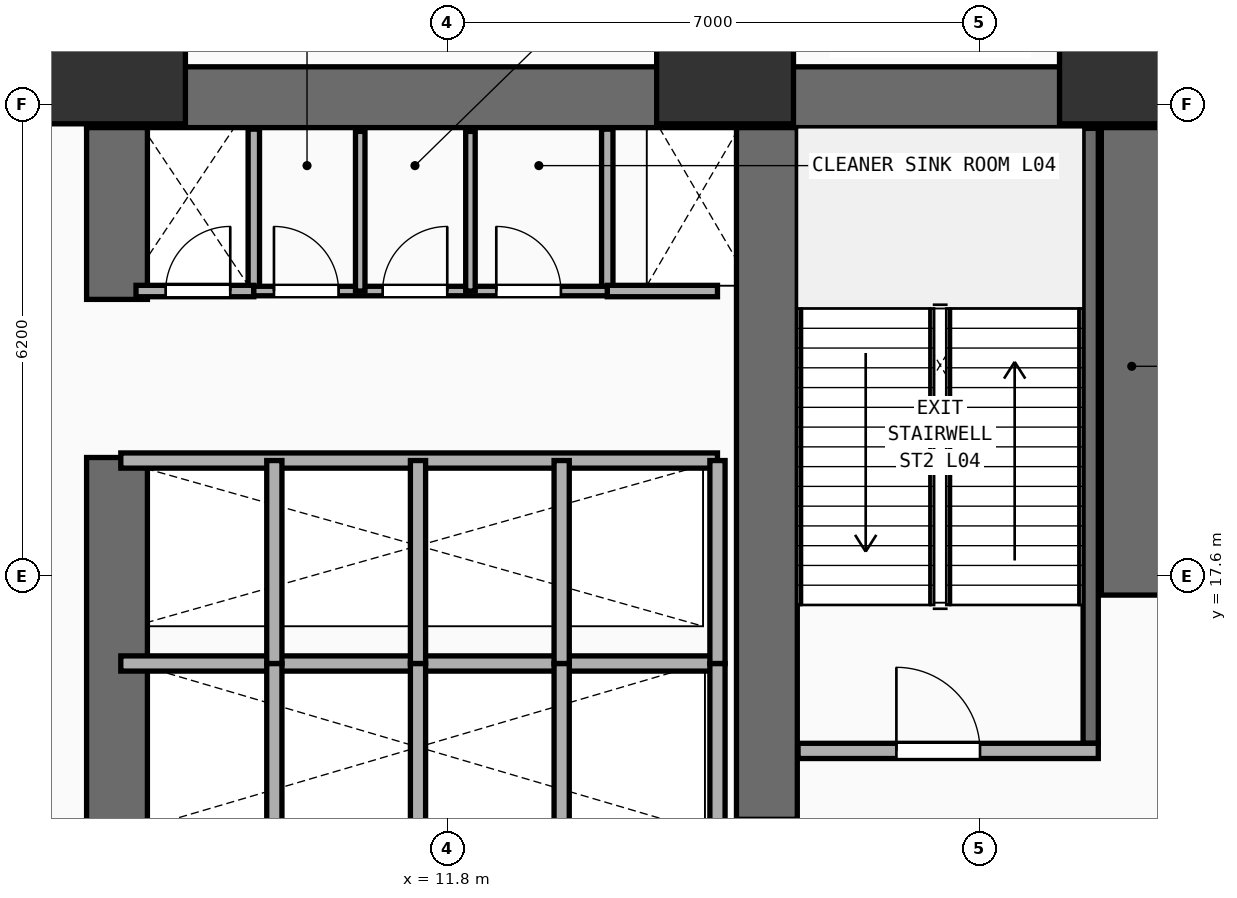
"""IFC4 building model, lengths in metres.
Left out: names, types, materials, properties, quantities, classifications, styles, units other than length and angle.
Written with IfcOpenShell. Run it as: python <this file> out.ifc"""

import sys

from ifc_helpers import new_model, si_unit, direction, frame, frame_2d, origin, origin_2d, place, context, subcontext, project, spatial, rectangle, extrude, element, fill, save


model = new_model("IFC4")
c1 = context("Model", 3, precision=1e-05, world=origin(), true_north=direction((0.0, 1.0)))
c2 = subcontext(c1, "Body", "Model", "MODEL_VIEW")
j1 = project(units=[si_unit("LENGTHUNIT", "METRE"), si_unit("PLANEANGLEUNIT", "RADIAN")], contexts=[c1])
p1 = place(None, origin())
s1 = spatial("IfcSite", under=j1, at=p1, CompositionType="ELEMENT")
p2 = place(p1, origin())
s2 = spatial("IfcBuilding", under=s1, at=p2, CompositionType="ELEMENT")
p3 = place(p2, frame((0.0, 0.0, 15.2)))
s3 = spatial("IfcBuildingStorey", under=s2, at=p3, CompositionType="ELEMENT", Elevation=15.2)
p4 = place(p3, frame((7.05, 23.9, 0.0), z_axis=(0.0, 0.0, 1.0), x_axis=(1.0, 0.0, 0.0)))
e1 = element("IfcWall", 1, at=p4, inside=s3, PredefinedType="SHEAR", context=c2, shape_type="SweptSolid", body=[
    extrude(rectangle(XDim=14.15, YDim=0.8, at=frame_2d((7.075, 0.0))), origin(), (0.0, 0.0, 1.0), 4.46),
])
p5 = place(p3, frame((7.45, 14.35, 0.0), z_axis=(0.0, 0.0, 1.0), x_axis=(0.0, 1.0, 0.0)))
e2 = element("IfcWall", 2, at=p5, inside=s3, PredefinedType="SHEAR", context=c2, shape_type="SweptSolid", body=[
    extrude(rectangle(XDim=4.81, YDim=0.8, at=frame_2d((2.405, 0.0))), origin(), (0.0, 0.0, 1.0), 4.46),
])
p6 = place(p3, frame((7.45, 21.24, 0.0), z_axis=(0.0, 0.0, 1.0), x_axis=(0.0, 1.0, 0.0)))
e3 = element("IfcWall", 3, at=p6, inside=s3, PredefinedType="SHEAR", context=c2, shape_type="SweptSolid", body=[
    extrude(rectangle(XDim=2.26, YDim=0.8, at=frame_2d((1.13, 0.0))), origin(), (0.0, 0.0, 1.0), 4.46),
])
p7 = place(p3, frame((20.8, 17.35, 0.0), z_axis=(0.0, 0.0, 1.0), x_axis=(0.0, 1.0, 0.0)))
e4 = element("IfcWall", 4, at=p7, inside=s3, PredefinedType="SHEAR", context=c2, shape_type="SweptSolid", body=[
    extrude(rectangle(XDim=6.15, YDim=0.8, at=frame_2d((3.075, 0.0))), origin(), (0.0, 0.0, 1.0), 4.46),
])
p8 = place(p3, frame((16.0, 14.4, 0.0), z_axis=(0.0, 0.0, 1.0), x_axis=(0.0, 1.0, 0.0)))
e5 = element("IfcWall", 5, at=p8, inside=s3, PredefinedType="SHEAR", context=c2, shape_type="SweptSolid", body=[
    extrude(rectangle(XDim=9.1, YDim=0.8, at=frame_2d((4.55, 0.0))), origin(), (0.0, 0.0, 1.0), 4.46),
])
for number, where, z_axis, x_axis in (
    (6, (7.45, 24.45, 0.0), (0.0, 0.0, 1.0), (1.0, 0.0, 0.0)),
    (7, (15.45, 24.45, 0.0), (0.0, 0.0, 1.0), (1.0, 0.0, 0.0)),
    (8, (20.75, 24.45, 0.0), (0.0, 0.0, 1.0), (1.0, 0.0, 0.0)),
):
    element("IfcColumn", number, at=place(p3, frame(where, z_axis=z_axis, x_axis=x_axis)), inside=s3, PredefinedType="COLUMN", context=c2, shape_type="SweptSolid", body=[
        extrude(rectangle(XDim=1.8, YDim=1.8, at=origin_2d()), origin(), (0.0, 0.0, 1.0), 4.46),
    ])
p9 = place(p3, frame((20.26, 15.4, 0.0), z_axis=(0.0, 0.0, 1.0), x_axis=(0.0, 1.0, 0.0)))
e9 = element("IfcWall", 9, at=p9, inside=s3, PredefinedType="SHEAR", context=c2, shape_type="SweptSolid", body=[
    extrude(rectangle(XDim=8.09, YDim=0.2, at=frame_2d((4.045, 0.0))), origin(), (0.0, 0.0, 1.0), 4.46),
])
p10 = place(p3, frame((16.41, 15.3, 0.0), z_axis=(0.0, 0.0, 1.0), x_axis=(1.0, 0.0, 0.0)))
e10 = element("IfcWall", 10, at=p10, inside=s3, PredefinedType="PARTITIONING", context=c2, shape_type="SweptSolid", body=[
    extrude(rectangle(XDim=3.95, YDim=0.2, at=frame_2d((1.975, 0.0))), origin(), (0.0, 0.0, 1.0), 4.46),
])
p11 = place(p10, frame((1.294, 0.0, 0.0)))
e11 = element("IfcOpeningElement", 11, at=p11, cuts=e10, PredefinedType="OPENING", context=c2, shape_type="SweptSolid", body=[
    extrude(rectangle(XDim=1.1, YDim=2.2, at=frame_2d((0.55, 1.1))), frame((0.0, 0.11, 0.0), z_axis=(0.0, -1.0, 0.0), x_axis=(1.0, 0.0, 0.0)), (0.0, 0.0, 1.0), 0.22),
])
p12 = place(p3, frame((7.5, 16.45, 0.0), z_axis=(0.0, 0.0, 1.0), x_axis=(1.0, 0.0, 0.0)))
e12 = element("IfcWall", 12, at=p12, inside=s3, PredefinedType="PARTITIONING", context=c2, shape_type="SweptSolid", body=[
    extrude(rectangle(XDim=7.85, YDim=0.2, at=frame_2d((3.925, 0.0))), origin(), (0.0, 0.0, 1.0), 4.46),
])
for number, where, z_axis, x_axis in (
    (13, (15.35, 14.22, 0.0), (0.0, 0.0, 1.0), (0.0, 1.0, 0.0)),
    (14, (9.52, 14.22, 0.0), (0.0, 0.0, 1.0), (0.0, 1.0, 0.0)),
    (15, (11.41, 14.22, 0.0), (0.0, 0.0, 1.0), (0.0, 1.0, 0.0)),
    (16, (13.3, 14.22, 0.0), (0.0, 0.0, 1.0), (0.0, 1.0, 0.0)),
):
    element("IfcWall", number, at=place(p3, frame(where, z_axis=z_axis, x_axis=x_axis)), inside=s3, PredefinedType="PARTITIONING", context=c2, shape_type="SweptSolid", body=[
        extrude(rectangle(XDim=2.23, YDim=0.2, at=frame_2d((1.115, 0.0))), origin(), (0.0, 0.0, 1.0), 4.46),
    ])
p13 = place(p3, frame((7.5, 19.12, 0.0), z_axis=(0.0, 0.0, 1.0), x_axis=(1.0, 0.0, 0.0)))
e17 = element("IfcWall", 17, at=p13, inside=s3, PredefinedType="PARTITIONING", context=c2, shape_type="SweptSolid", body=[
    extrude(rectangle(XDim=7.85, YDim=0.2, at=frame_2d((3.925, 0.0))), origin(), (0.0, 0.0, 1.0), 4.46),
])
for number, where, z_axis, x_axis in (
    (18, (15.35, 16.45, 0.0), (0.0, 0.0, 1.0), (0.0, 1.0, 0.0)),
    (19, (9.52, 16.45, 0.0), (0.0, 0.0, 1.0), (0.0, 1.0, 0.0)),
    (20, (11.41, 16.45, 0.0), (0.0, 0.0, 1.0), (0.0, 1.0, 0.0)),
    (21, (13.3, 16.45, 0.0), (0.0, 0.0, 1.0), (0.0, 1.0, 0.0)),
):
    element("IfcWall", number, at=place(p3, frame(where, z_axis=z_axis, x_axis=x_axis)), inside=s3, PredefinedType="PARTITIONING", context=c2, shape_type="SweptSolid", body=[
        extrude(rectangle(XDim=2.67, YDim=0.2, at=frame_2d((1.335, 0.0))), origin(), (0.0, 0.0, 1.0), 4.46),
    ])
for number, where, z_axis, x_axis in (
    (22, (9.25, 21.35, 0.0), (0.0, 0.0, 1.0), (0.0, 1.0, 0.0)),
    (23, (13.9, 21.35, 0.0), (0.0, 0.0, 1.0), (0.0, 1.0, 0.0)),
):
    element("IfcWall", number, at=place(p3, frame(where, z_axis=z_axis, x_axis=x_axis)), inside=s3, PredefinedType="PARTITIONING", context=c2, shape_type="SweptSolid", body=[
        extrude(rectangle(XDim=2.13, YDim=0.15, at=frame_2d((1.065, 0.0))), origin(), (0.0, 0.0, 1.0), 4.46),
    ])
p14 = place(p3, frame((7.7, 21.35, 0.0), z_axis=(0.0, 0.0, 1.0), x_axis=(1.0, 0.0, 0.0)))
e24 = element("IfcWall", 24, at=p14, inside=s3, PredefinedType="PARTITIONING", context=c2, shape_type="SweptSolid", body=[
    extrude(rectangle(XDim=1.55, YDim=0.15, at=frame_2d((0.775, 0.0))), origin(), (0.0, 0.0, 1.0), 4.46),
])
p15 = place(p14, frame((0.39, 0.0, 0.0)))
e25 = element("IfcOpeningElement", 25, at=p15, cuts=e24, PredefinedType="OPENING", context=c2, shape_type="SweptSolid", body=[
    extrude(rectangle(XDim=0.85, YDim=2.15, at=frame_2d((0.425, 1.075))), frame((0.0, 0.085, 0.0), z_axis=(0.0, -1.0, 0.0), x_axis=(1.0, 0.0, 0.0)), (0.0, 0.0, 1.0), 0.17),
])
p16 = place(p3, frame((13.9, 21.35, 0.0), z_axis=(0.0, 0.0, 1.0), x_axis=(1.0, 0.0, 0.0)))
e26 = element("IfcWall", 26, at=p16, inside=s3, PredefinedType="PARTITIONING", context=c2, shape_type="SweptSolid", body=[
    extrude(rectangle(XDim=1.45, YDim=0.15, at=frame_2d((0.725, 0.0))), origin(), (0.0, 0.0, 1.0), 4.46),
])
p17 = place(p3, frame((9.25, 21.35, 0.0), z_axis=(0.0, 0.0, 1.0), x_axis=(1.0, 0.0, 0.0)))
e27 = element("IfcWall", 27, at=p17, inside=s3, PredefinedType="PARTITIONING", context=c2, shape_type="SweptSolid", body=[
    extrude(rectangle(XDim=4.65, YDim=0.125, at=frame_2d((2.325, 0.0))), origin(), (0.0, 0.0, 1.0), 4.46),
])
p18 = place(p17, frame((0.265, 0.0, 0.0)))
e28 = element("IfcOpeningElement", 28, at=p18, cuts=e27, PredefinedType="OPENING", context=c2, shape_type="SweptSolid", body=[
    extrude(rectangle(XDim=0.85, YDim=2.15, at=frame_2d((0.425, 1.075))), frame((0.0, 0.073, 0.0), z_axis=(0.0, -1.0, 0.0), x_axis=(1.0, 0.0, 0.0)), (0.0, 0.0, 1.0), 0.145),
])
p19 = place(p17, frame((1.695, 0.0, 0.0)))
e29 = element("IfcOpeningElement", 29, at=p19, cuts=e27, PredefinedType="OPENING", context=c2, shape_type="SweptSolid", body=[
    extrude(rectangle(XDim=0.85, YDim=2.15, at=frame_2d((0.425, 1.075))), frame((0.0, 0.073, 0.0), z_axis=(0.0, -1.0, 0.0), x_axis=(1.0, 0.0, 0.0)), (0.0, 0.0, 1.0), 0.145),
])
p20 = place(p17, frame((3.19, 0.0, 0.0)))
e30 = element("IfcOpeningElement", 30, at=p20, cuts=e27, PredefinedType="OPENING", context=c2, shape_type="SweptSolid", body=[
    extrude(rectangle(XDim=0.85, YDim=2.15, at=frame_2d((0.425, 1.075))), frame((0.0, 0.073, 0.0), z_axis=(0.0, -1.0, 0.0), x_axis=(1.0, 0.0, 0.0)), (0.0, 0.0, 1.0), 0.145),
])
for number, where, z_axis, x_axis in (
    (31, (10.65, 21.35, 0.0), (0.0, 0.0, 1.0), (0.0, 1.0, 0.0)),
    (32, (12.1, 21.35, 0.0), (0.0, 0.0, 1.0), (0.0, 1.0, 0.0)),
):
    element("IfcWall", number, at=place(p3, frame(where, z_axis=z_axis, x_axis=x_axis)), inside=s3, PredefinedType="PARTITIONING", context=c2, shape_type="SweptSolid", body=[
        extrude(rectangle(XDim=2.1, YDim=0.125, at=frame_2d((1.05, 0.0))), origin(), (0.0, 0.0, 1.0), 4.46),
    ])
p21 = place(p11, origin())
e33 = element("IfcDoor", 33, at=p21, inside=s3, OperationType="SINGLE_SWING_LEFT", PredefinedType="DOOR", context=c2, shape_type="SweptSolid", body=[
    extrude(rectangle(XDim=1.1, YDim=2.2, at=frame_2d((0.55, 1.1))), frame((0.0, 0.025, 0.0), z_axis=(0.0, -1.0, 0.0), x_axis=(1.0, 0.0, 0.0)), (0.0, 0.0, 1.0), 0.05),
])
fill(e11, e33)
p22 = place(p15, origin())
e34 = element("IfcDoor", 34, at=p22, inside=s3, OperationType="SINGLE_SWING_RIGHT", PredefinedType="DOOR", context=c2, shape_type="SweptSolid", body=[
    extrude(rectangle(XDim=0.85, YDim=2.15, at=frame_2d((0.425, 1.075))), frame((0.0, 0.025, 0.0), z_axis=(0.0, -1.0, 0.0), x_axis=(1.0, 0.0, 0.0)), (0.0, 0.0, 1.0), 0.05),
])
fill(e25, e34)
p23 = place(p18, origin())
e35 = element("IfcDoor", 35, at=p23, inside=s3, OperationType="SINGLE_SWING_LEFT", PredefinedType="DOOR", context=c2, shape_type="SweptSolid", body=[
    extrude(rectangle(XDim=0.85, YDim=2.15, at=frame_2d((0.425, 1.075))), frame((0.0, 0.025, 0.0), z_axis=(0.0, -1.0, 0.0), x_axis=(1.0, 0.0, 0.0)), (0.0, 0.0, 1.0), 0.05),
])
fill(e28, e35)
p24 = place(p19, origin())
e36 = element("IfcDoor", 36, at=p24, inside=s3, OperationType="SINGLE_SWING_RIGHT", PredefinedType="DOOR", context=c2, shape_type="SweptSolid", body=[
    extrude(rectangle(XDim=0.85, YDim=2.15, at=frame_2d((0.425, 1.075))), frame((0.0, 0.025, 0.0), z_axis=(0.0, -1.0, 0.0), x_axis=(1.0, 0.0, 0.0)), (0.0, 0.0, 1.0), 0.05),
])
fill(e29, e36)
p25 = place(p20, origin())
e37 = element("IfcDoor", 37, at=p25, inside=s3, OperationType="SINGLE_SWING_LEFT", PredefinedType="DOOR", context=c2, shape_type="SweptSolid", body=[
    extrude(rectangle(XDim=0.85, YDim=2.15, at=frame_2d((0.425, 1.075))), frame((0.0, 0.025, 0.0), z_axis=(0.0, -1.0, 0.0), x_axis=(1.0, 0.0, 0.0)), (0.0, 0.0, 1.0), 0.05),
])
fill(e30, e37)
save(model, sys.argv[1])
